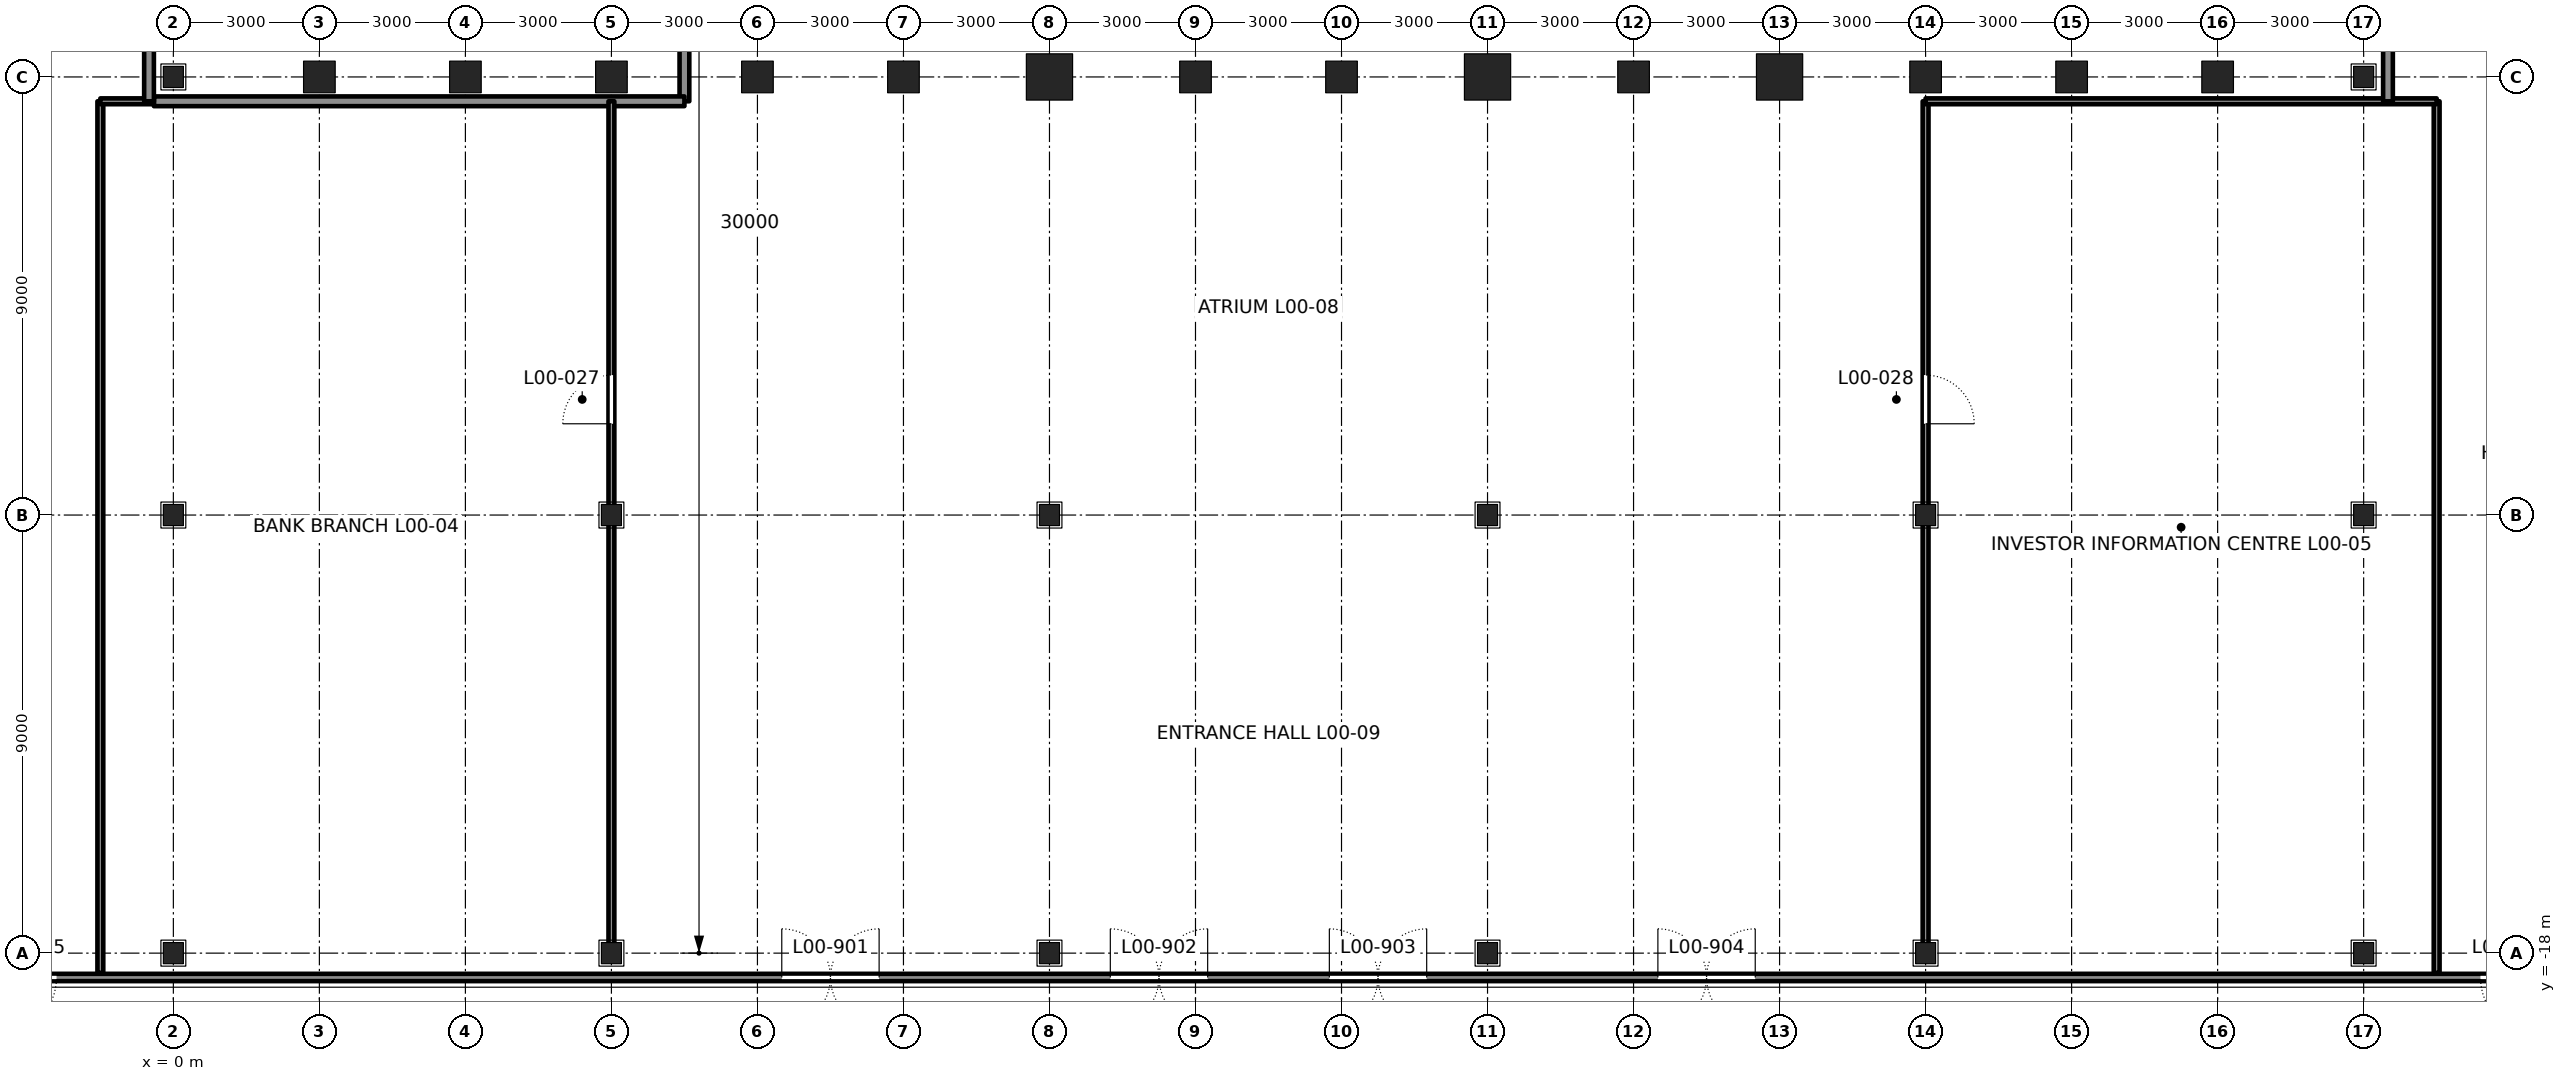
"""IFC4 building model, lengths in metres.
Left out: names, types, materials, properties, quantities, classifications, styles, units other than length and angle.
Written with IfcOpenShell. Run it as: python <this file> out.ifc"""

import sys

from ifc_helpers import new_model, si_unit, direction, frame, frame_2d, origin, origin_2d, place, context, subcontext, project, spatial, rectangle, hollow_rectangle, i_section, extrude, element, fill, save


model = new_model("IFC4")
c1 = context("Model", 3, precision=1e-05, world=origin(), true_north=direction((0.0, 1.0)))
c2 = subcontext(c1, "Body", "Model", "MODEL_VIEW")
j1 = project(units=[si_unit("LENGTHUNIT", "METRE"), si_unit("PLANEANGLEUNIT", "RADIAN")], contexts=[c1])
p1 = place(None, origin())
s1 = spatial("IfcSite", under=j1, at=p1, CompositionType="ELEMENT")
p2 = place(p1, origin())
s2 = spatial("IfcBuilding", under=s1, at=p2, CompositionType="ELEMENT")
p3 = place(p2, origin())
s3 = spatial("IfcBuildingStorey", under=s2, at=p3, CompositionType="ELEMENT", Elevation=0.0)
for number, where, z_axis, x_axis in (
    (1, (3.0, 0.0, 0.0), (0.0, 0.0, 1.0), (0.0, -1.0, 0.0)),
    (2, (6.0, 0.0, 0.0), (0.0, 0.0, 1.0), (0.0, -1.0, 0.0)),
    (3, (9.0, 0.0, 0.0), (0.0, 0.0, 1.0), (0.0, -1.0, 0.0)),
    (4, (12.0, 0.0, 0.0), (0.0, 0.0, 1.0), (0.0, -1.0, 0.0)),
    (5, (15.0, 0.0, 0.0), (0.0, 0.0, 1.0), (0.0, -1.0, 0.0)),
):
    element("IfcColumn", number, at=place(p3, frame(where, z_axis=z_axis, x_axis=x_axis)), inside=s3, PredefinedType="COLUMN", context=c2, shape_type="SweptSolid", body=[
        extrude(hollow_rectangle(XDim=0.65, YDim=0.65, WallThickness=0.065, at=origin_2d()), origin(), (0.0, 0.0, 1.0), 6.0),
    ])
p4 = place(p3, frame((18.0, 0.0, 0.0), z_axis=(0.0, 0.0, 1.0), x_axis=(0.0, -1.0, 0.0)))
e6 = element("IfcColumn", 6, at=p4, inside=s3, PredefinedType="COLUMN", context=c2, shape_type="SweptSolid", body=[
    extrude(hollow_rectangle(XDim=0.95, YDim=0.95, WallThickness=0.11, at=origin_2d()), origin(), (0.0, 0.0, 1.0), 6.0),
])
for number, where, z_axis, x_axis in (
    (7, (21.0, 0.0, 0.0), (0.0, 0.0, 1.0), (0.0, -1.0, 0.0)),
    (8, (24.0, 0.0, 0.0), (0.0, 0.0, 1.0), (0.0, -1.0, 0.0)),
):
    element("IfcColumn", number, at=place(p3, frame(where, z_axis=z_axis, x_axis=x_axis)), inside=s3, PredefinedType="COLUMN", context=c2, shape_type="SweptSolid", body=[
        extrude(hollow_rectangle(XDim=0.65, YDim=0.65, WallThickness=0.065, at=origin_2d()), origin(), (0.0, 0.0, 1.0), 6.0),
    ])
p5 = place(p3, frame((27.0, 0.0, 0.0), z_axis=(0.0, 0.0, 1.0), x_axis=(0.0, -1.0, 0.0)))
e9 = element("IfcColumn", 9, at=p5, inside=s3, PredefinedType="COLUMN", context=c2, shape_type="SweptSolid", body=[
    extrude(hollow_rectangle(XDim=0.95, YDim=0.95, WallThickness=0.11, at=origin_2d()), origin(), (0.0, 0.0, 1.0), 6.0),
])
p6 = place(p3, frame((30.0, 0.0, 0.0), z_axis=(0.0, 0.0, 1.0), x_axis=(0.0, -1.0, 0.0)))
e10 = element("IfcColumn", 10, at=p6, inside=s3, PredefinedType="COLUMN", context=c2, shape_type="SweptSolid", body=[
    extrude(hollow_rectangle(XDim=0.65, YDim=0.65, WallThickness=0.065, at=origin_2d()), origin(), (0.0, 0.0, 1.0), 6.0),
])
p7 = place(p3, frame((33.0, 0.0, 0.0), z_axis=(0.0, 0.0, 1.0), x_axis=(0.0, -1.0, 0.0)))
e11 = element("IfcColumn", 11, at=p7, inside=s3, PredefinedType="COLUMN", context=c2, shape_type="SweptSolid", body=[
    extrude(hollow_rectangle(XDim=0.95, YDim=0.95, WallThickness=0.11, at=origin_2d()), origin(), (0.0, 0.0, 1.0), 6.0),
])
for number, where, z_axis, x_axis in (
    (12, (36.0, 0.0, 0.0), (0.0, 0.0, 1.0), (0.0, -1.0, 0.0)),
    (13, (39.0, 0.0, 0.0), (0.0, 0.0, 1.0), (0.0, -1.0, 0.0)),
    (14, (42.0, 0.0, 0.0), (0.0, 0.0, 1.0), (0.0, -1.0, 0.0)),
):
    element("IfcColumn", number, at=place(p3, frame(where, z_axis=z_axis, x_axis=x_axis)), inside=s3, PredefinedType="COLUMN", context=c2, shape_type="SweptSolid", body=[
        extrude(hollow_rectangle(XDim=0.65, YDim=0.65, WallThickness=0.065, at=origin_2d()), origin(), (0.0, 0.0, 1.0), 6.0),
    ])
for number, where, z_axis, x_axis in (
    (15, (0.0, -18.0, 0.0), (0.0, 0.0, 1.0), (1.0, 0.0, 0.0)),
    (16, (0.0, -9.0, 0.0), (0.0, 0.0, 1.0), (1.0, 0.0, 0.0)),
    (17, (0.0, 0.0, 0.0), (0.0, 0.0, 1.0), (1.0, 0.0, 0.0)),
    (18, (9.0, -18.0, 0.0), (0.0, 0.0, 1.0), (1.0, 0.0, 0.0)),
    (19, (9.0, -9.0, 0.0), (0.0, 0.0, 1.0), (1.0, 0.0, 0.0)),
    (20, (18.0, -18.0, 0.0), (0.0, 0.0, 1.0), (1.0, 0.0, 0.0)),
    (21, (18.0, -9.0, 0.0), (0.0, 0.0, 1.0), (1.0, 0.0, 0.0)),
    (22, (27.0, -18.0, 0.0), (0.0, 0.0, 1.0), (1.0, 0.0, 0.0)),
    (23, (27.0, -9.0, 0.0), (0.0, 0.0, 1.0), (1.0, 0.0, 0.0)),
    (24, (36.0, -18.0, 0.0), (0.0, 0.0, 1.0), (1.0, 0.0, 0.0)),
    (25, (36.0, -9.0, 0.0), (0.0, 0.0, 1.0), (1.0, 0.0, 0.0)),
    (26, (45.0, -18.0, 0.0), (0.0, 0.0, 1.0), (1.0, 0.0, 0.0)),
    (27, (45.0, -9.0, 0.0), (0.0, 0.0, 1.0), (1.0, 0.0, 0.0)),
    (28, (45.0, 0.0, 0.0), (0.0, 0.0, 1.0), (1.0, 0.0, 0.0)),
):
    element("IfcColumn", number, at=place(p3, frame(where, z_axis=z_axis, x_axis=x_axis)), inside=s3, PredefinedType="COLUMN", context=c2, shape_type="SweptSolid", body=[
        extrude(i_section(OverallWidth=0.411, OverallDepth=0.434, WebThickness=0.036, FlangeThickness=0.057, at=origin_2d()), origin(), (0.0, 0.0, 1.0), 6.0),
    ])
p8 = place(p3, frame((-9.5, -18.5, 0.0), z_axis=(0.0, 0.0, 1.0), x_axis=(1.0, 0.0, 0.0)))
e29 = element("IfcWall", 29, at=p8, inside=s3, PredefinedType="SOLIDWALL", context=c2, shape_type="SweptSolid", body=[
    extrude(rectangle(XDim=64.0, YDim=0.15, at=frame_2d((32.0, 0.0))), origin(), (0.0, 0.0, 1.0), 5.8),
])
p9 = place(p8, frame((22.0, 0.0, 0.0)))
e30 = element("IfcOpeningElement", 30, at=p9, cuts=e29, PredefinedType="OPENING", context=c2, shape_type="SweptSolid", body=[
    extrude(rectangle(XDim=2.0, YDim=2.4, at=frame_2d((1.0, 1.2))), frame((0.0, 0.085, 0.0), z_axis=(0.0, -1.0, 0.0), x_axis=(1.0, 0.0, 0.0)), (0.0, 0.0, 1.0), 0.17),
])
p10 = place(p8, frame((28.75, 0.0, 0.0)))
e31 = element("IfcOpeningElement", 31, at=p10, cuts=e29, PredefinedType="OPENING", context=c2, shape_type="SweptSolid", body=[
    extrude(rectangle(XDim=2.0, YDim=2.4, at=frame_2d((1.0, 1.2))), frame((0.0, 0.085, 0.0), z_axis=(0.0, -1.0, 0.0), x_axis=(1.0, 0.0, 0.0)), (0.0, 0.0, 1.0), 0.17),
])
p11 = place(p8, frame((33.25, 0.0, 0.0)))
e32 = element("IfcOpeningElement", 32, at=p11, cuts=e29, PredefinedType="OPENING", context=c2, shape_type="SweptSolid", body=[
    extrude(rectangle(XDim=2.0, YDim=2.4, at=frame_2d((1.0, 1.2))), frame((0.0, 0.085, 0.0), z_axis=(0.0, -1.0, 0.0), x_axis=(1.0, 0.0, 0.0)), (0.0, 0.0, 1.0), 0.17),
])
p12 = place(p8, frame((40.0, 0.0, 0.0)))
e33 = element("IfcOpeningElement", 33, at=p12, cuts=e29, PredefinedType="OPENING", context=c2, shape_type="SweptSolid", body=[
    extrude(rectangle(XDim=2.0, YDim=2.4, at=frame_2d((1.0, 1.2))), frame((0.0, 0.085, 0.0), z_axis=(0.0, -1.0, 0.0), x_axis=(1.0, 0.0, 0.0)), (0.0, 0.0, 1.0), 0.17),
])
p13 = place(p8, frame((5.9, 0.0, 0.0)))
e34 = element("IfcOpeningElement", 34, at=p13, cuts=e29, PredefinedType="OPENING", context=c2, shape_type="SweptSolid", body=[
    extrude(rectangle(XDim=1.2, YDim=2.1, at=frame_2d((0.6, 1.05))), frame((0.0, 0.085, 0.0), z_axis=(0.0, -1.0, 0.0), x_axis=(1.0, 0.0, 0.0)), (0.0, 0.0, 1.0), 0.17),
])
p14 = place(p8, frame((56.9, 0.0, 0.0)))
e35 = element("IfcOpeningElement", 35, at=p14, cuts=e29, PredefinedType="OPENING", context=c2, shape_type="SweptSolid", body=[
    extrude(rectangle(XDim=1.2, YDim=2.1, at=frame_2d((0.6, 1.05))), frame((0.0, 0.085, 0.0), z_axis=(0.0, -1.0, 0.0), x_axis=(1.0, 0.0, 0.0)), (0.0, 0.0, 1.0), 0.17),
])
p15 = place(p3, frame((10.5, -0.5, 0.0), z_axis=(0.0, 0.0, 1.0), x_axis=(0.0, 1.0, 0.0)))
e36 = element("IfcWall", 36, at=p15, inside=s3, PredefinedType="SOLIDWALL", context=c2, shape_type="SweptSolid", body=[
    extrude(rectangle(XDim=11.0, YDim=0.2, at=frame_2d((5.5, 0.0))), origin(), (0.0, 0.0, 1.0), 5.8),
])
p16 = place(p15, frame((4.75, 0.0, 0.0)))
e37 = element("IfcOpeningElement", 37, at=p16, cuts=e36, PredefinedType="OPENING", context=c2, shape_type="SweptSolid", body=[
    extrude(rectangle(XDim=1.5, YDim=2.1, at=frame_2d((0.75, 1.05))), frame((0.0, 0.11, 0.0), z_axis=(0.0, -1.0, 0.0), x_axis=(1.0, 0.0, 0.0)), (0.0, 0.0, 1.0), 0.22),
])
p17 = place(p3, frame((-0.4, -0.5, 0.0), z_axis=(0.0, 0.0, 1.0), x_axis=(1.0, 0.0, 0.0)))
e38 = element("IfcWall", 38, at=p17, inside=s3, PredefinedType="SOLIDWALL", context=c2, shape_type="SweptSolid", body=[
    extrude(rectangle(XDim=10.9, YDim=0.2, at=frame_2d((5.45, 0.0))), origin(), (0.0, 0.0, 1.0), 5.8),
])
p18 = place(p3, frame((9.0, -18.0, 0.0), z_axis=(0.0, 0.0, 1.0), x_axis=(0.0, 1.0, 0.0)))
e39 = element("IfcWall", 39, at=p18, inside=s3, PredefinedType="PARTITIONING", context=c2, shape_type="SweptSolid", body=[
    extrude(rectangle(XDim=17.5, YDim=0.12, at=frame_2d((8.75, 0.0))), origin(), (0.0, 0.0, 1.0), 4.853),
])
p19 = place(p18, frame((10.875, 0.0, 0.0)))
e40 = element("IfcOpeningElement", 40, at=p19, cuts=e39, PredefinedType="OPENING", context=c2, shape_type="SweptSolid", body=[
    extrude(rectangle(XDim=1.0, YDim=2.4, at=frame_2d((0.5, 1.2))), frame((0.0, 0.07, 0.0), z_axis=(0.0, -1.0, 0.0), x_axis=(1.0, 0.0, 0.0)), (0.0, 0.0, 1.0), 0.14),
])
p20 = place(p3, frame((36.0, -18.0, 0.0), z_axis=(0.0, 0.0, 1.0), x_axis=(0.0, 1.0, 0.0)))
e41 = element("IfcWall", 41, at=p20, inside=s3, PredefinedType="PARTITIONING", context=c2, shape_type="SweptSolid", body=[
    extrude(rectangle(XDim=17.5, YDim=0.12, at=frame_2d((8.75, 0.0))), origin(), (0.0, 0.0, 1.0), 4.853),
])
p21 = place(p20, frame((10.875, 0.0, 0.0)))
e42 = element("IfcOpeningElement", 42, at=p21, cuts=e41, PredefinedType="OPENING", context=c2, shape_type="SweptSolid", body=[
    extrude(rectangle(XDim=1.0, YDim=2.4, at=frame_2d((0.5, 1.2))), frame((0.0, 0.07, 0.0), z_axis=(0.0, -1.0, 0.0), x_axis=(1.0, 0.0, 0.0)), (0.0, 0.0, 1.0), 0.14),
])
p22 = place(p3, frame((-1.5, -18.405, 0.0), z_axis=(0.0, 0.0, 1.0), x_axis=(0.0, 1.0, 0.0)))
e43 = element("IfcWall", 43, at=p22, inside=s3, PredefinedType="PARTITIONING", context=c2, shape_type="SweptSolid", body=[
    extrude(rectangle(XDim=17.905, YDim=0.12, at=frame_2d((8.953, 0.0))), origin(), (0.0, 0.0, 1.0), 5.8),
])
p23 = place(p3, frame((-1.5, -0.5, 0.0), z_axis=(0.0, 0.0, 1.0), x_axis=(1.0, 0.0, 0.0)))
e44 = element("IfcWall", 44, at=p23, inside=s3, PredefinedType="PARTITIONING", context=c2, shape_type="SweptSolid", body=[
    extrude(rectangle(XDim=1.1, YDim=0.12, at=frame_2d((0.55, 0.0))), origin(), (0.0, 0.0, 1.0), 5.8),
])
p24 = place(p3, frame((46.5, -18.405, 0.0), z_axis=(0.0, 0.0, 1.0), x_axis=(0.0, 1.0, 0.0)))
e45 = element("IfcWall", 45, at=p24, inside=s3, PredefinedType="PARTITIONING", context=c2, shape_type="SweptSolid", body=[
    extrude(rectangle(XDim=17.905, YDim=0.12, at=frame_2d((8.953, 0.0))), origin(), (0.0, 0.0, 1.0), 5.8),
])
p25 = place(p3, frame((36.0, -0.5, 0.0), z_axis=(0.0, 0.0, 1.0), x_axis=(1.0, 0.0, 0.0)))
e46 = element("IfcWall", 46, at=p25, inside=s3, PredefinedType="PARTITIONING", context=c2, shape_type="SweptSolid", body=[
    extrude(rectangle(XDim=10.5, YDim=0.12, at=frame_2d((5.25, 0.0))), origin(), (0.0, 0.0, 1.0), 5.8),
])
p26 = place(p3, frame((-0.5, -0.5, 0.0), z_axis=(0.0, 0.0, 1.0), x_axis=(0.0, 1.0, 0.0)))
e47 = element("IfcWall", 47, at=p26, inside=s3, PredefinedType="PARTITIONING", context=c2, shape_type="SweptSolid", body=[
    extrude(rectangle(XDim=45.98, YDim=0.2, at=frame_2d((22.99, 0.0))), origin(), (0.0, 0.0, 1.0), 5.8),
])
p27 = place(p26, frame((13.1, 0.0, 0.0)))
e48 = element("IfcOpeningElement", 48, at=p27, cuts=e47, PredefinedType="OPENING", context=c2, shape_type="SweptSolid", body=[
    extrude(rectangle(XDim=1.8, YDim=2.4, at=frame_2d((0.9, 1.2))), frame((0.0, 0.11, 0.0), z_axis=(0.0, -1.0, 0.0), x_axis=(1.0, 0.0, 0.0)), (0.0, 0.0, 1.0), 0.22),
])
p28 = place(p26, frame((19.1, 0.0, 0.0)))
e49 = element("IfcOpeningElement", 49, at=p28, cuts=e47, PredefinedType="OPENING", context=c2, shape_type="SweptSolid", body=[
    extrude(rectangle(XDim=1.8, YDim=2.4, at=frame_2d((0.9, 1.2))), frame((0.0, 0.11, 0.0), z_axis=(0.0, -1.0, 0.0), x_axis=(1.0, 0.0, 0.0)), (0.0, 0.0, 1.0), 0.22),
])
p29 = place(p26, frame((31.1, 0.0, 0.0)))
e50 = element("IfcOpeningElement", 50, at=p29, cuts=e47, PredefinedType="OPENING", context=c2, shape_type="SweptSolid", body=[
    extrude(rectangle(XDim=1.8, YDim=2.4, at=frame_2d((0.9, 1.2))), frame((0.0, 0.11, 0.0), z_axis=(0.0, -1.0, 0.0), x_axis=(1.0, 0.0, 0.0)), (0.0, 0.0, 1.0), 0.22),
])
p30 = place(p3, frame((45.5, -0.5, 0.0), z_axis=(0.0, 0.0, 1.0), x_axis=(0.0, 1.0, 0.0)))
e51 = element("IfcWall", 51, at=p30, inside=s3, PredefinedType="PARTITIONING", context=c2, shape_type="SweptSolid", body=[
    extrude(rectangle(XDim=45.98, YDim=0.2, at=frame_2d((22.99, 0.0))), origin(), (0.0, 0.0, 1.0), 5.8),
])
p31 = place(p30, frame((10.1, 0.0, 0.0)))
e52 = element("IfcOpeningElement", 52, at=p31, cuts=e51, PredefinedType="OPENING", context=c2, shape_type="SweptSolid", body=[
    extrude(rectangle(XDim=1.8, YDim=2.4, at=frame_2d((0.9, 1.2))), frame((0.0, 0.11, 0.0), z_axis=(0.0, -1.0, 0.0), x_axis=(1.0, 0.0, 0.0)), (0.0, 0.0, 1.0), 0.22),
])
p32 = place(p30, frame((31.1, 0.0, 0.0)))
e53 = element("IfcOpeningElement", 53, at=p32, cuts=e51, PredefinedType="OPENING", context=c2, shape_type="SweptSolid", body=[
    extrude(rectangle(XDim=1.8, YDim=2.4, at=frame_2d((0.9, 1.2))), frame((0.0, 0.11, 0.0), z_axis=(0.0, -1.0, 0.0), x_axis=(1.0, 0.0, 0.0)), (0.0, 0.0, 1.0), 0.22),
])
p33 = place(p9, origin())
e54 = element("IfcDoor", 54, at=p33, inside=s3, OperationType="DOUBLE_DOOR_DOUBLE_SWING", PredefinedType="DOOR", context=c2, shape_type="SweptSolid", body=[
    extrude(rectangle(XDim=2.0, YDim=2.4, at=frame_2d((1.0, 1.2))), frame((0.0, 0.025, 0.0), z_axis=(0.0, -1.0, 0.0), x_axis=(1.0, 0.0, 0.0)), (0.0, 0.0, 1.0), 0.05),
])
fill(e30, e54)
p34 = place(p10, origin())
e55 = element("IfcDoor", 55, at=p34, inside=s3, OperationType="DOUBLE_DOOR_DOUBLE_SWING", PredefinedType="DOOR", context=c2, shape_type="SweptSolid", body=[
    extrude(rectangle(XDim=2.0, YDim=2.4, at=frame_2d((1.0, 1.2))), frame((0.0, 0.025, 0.0), z_axis=(0.0, -1.0, 0.0), x_axis=(1.0, 0.0, 0.0)), (0.0, 0.0, 1.0), 0.05),
])
fill(e31, e55)
p35 = place(p11, origin())
e56 = element("IfcDoor", 56, at=p35, inside=s3, OperationType="DOUBLE_DOOR_DOUBLE_SWING", PredefinedType="DOOR", context=c2, shape_type="SweptSolid", body=[
    extrude(rectangle(XDim=2.0, YDim=2.4, at=frame_2d((1.0, 1.2))), frame((0.0, 0.025, 0.0), z_axis=(0.0, -1.0, 0.0), x_axis=(1.0, 0.0, 0.0)), (0.0, 0.0, 1.0), 0.05),
])
fill(e32, e56)
p36 = place(p12, origin())
e57 = element("IfcDoor", 57, at=p36, inside=s3, OperationType="DOUBLE_DOOR_DOUBLE_SWING", PredefinedType="DOOR", context=c2, shape_type="SweptSolid", body=[
    extrude(rectangle(XDim=2.0, YDim=2.4, at=frame_2d((1.0, 1.2))), frame((0.0, 0.025, 0.0), z_axis=(0.0, -1.0, 0.0), x_axis=(1.0, 0.0, 0.0)), (0.0, 0.0, 1.0), 0.05),
])
fill(e33, e57)
p37 = place(p13, frame((1.2, 0.0, 0.0), z_axis=(0.0, 0.0, 1.0), x_axis=(-1.0, 0.0, 0.0)))
e58 = element("IfcDoor", 58, at=p37, inside=s3, OperationType="SINGLE_SWING_RIGHT", PredefinedType="DOOR", context=c2, shape_type="SweptSolid", body=[
    extrude(rectangle(XDim=1.2, YDim=2.1, at=frame_2d((0.6, 1.05))), frame((0.0, 0.025, 0.0), z_axis=(0.0, -1.0, 0.0), x_axis=(1.0, 0.0, 0.0)), (0.0, 0.0, 1.0), 0.05),
])
fill(e34, e58)
p38 = place(p14, frame((1.2, 0.0, 0.0), z_axis=(0.0, 0.0, 1.0), x_axis=(-1.0, 0.0, 0.0)))
e59 = element("IfcDoor", 59, at=p38, inside=s3, OperationType="SINGLE_SWING_LEFT", PredefinedType="DOOR", context=c2, shape_type="SweptSolid", body=[
    extrude(rectangle(XDim=1.2, YDim=2.1, at=frame_2d((0.6, 1.05))), frame((0.0, 0.025, 0.0), z_axis=(0.0, -1.0, 0.0), x_axis=(1.0, 0.0, 0.0)), (0.0, 0.0, 1.0), 0.05),
])
fill(e35, e59)
p39 = place(p19, origin())
e60 = element("IfcDoor", 60, at=p39, inside=s3, OperationType="SINGLE_SWING_LEFT", PredefinedType="DOOR", context=c2, shape_type="SweptSolid", body=[
    extrude(rectangle(XDim=1.0, YDim=2.4, at=frame_2d((0.5, 1.2))), frame((0.0, 0.025, 0.0), z_axis=(0.0, -1.0, 0.0), x_axis=(1.0, 0.0, 0.0)), (0.0, 0.0, 1.0), 0.05),
])
fill(e40, e60)
p40 = place(p21, frame((1.0, 0.0, 0.0), z_axis=(0.0, 0.0, 1.0), x_axis=(-1.0, 0.0, 0.0)))
e61 = element("IfcDoor", 61, at=p40, inside=s3, OperationType="SINGLE_SWING_RIGHT", PredefinedType="DOOR", context=c2, shape_type="SweptSolid", body=[
    extrude(rectangle(XDim=1.0, YDim=2.4, at=frame_2d((0.5, 1.2))), frame((0.0, 0.025, 0.0), z_axis=(0.0, -1.0, 0.0), x_axis=(1.0, 0.0, 0.0)), (0.0, 0.0, 1.0), 0.05),
])
fill(e42, e61)
save(model, sys.argv[1])
